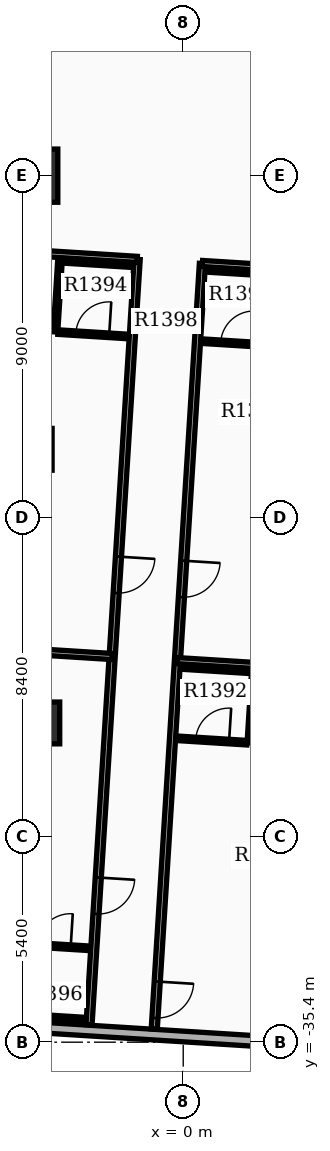
"""IFC4 building model, lengths in metres.
Left out: names, types, materials, properties, quantities, classifications, styles, units other than length and angle.
Written with IfcOpenShell. Run it as: python <this file> out.ifc"""

import sys

from ifc_helpers import new_model, si_unit, direction, frame, frame_2d, origin, origin_2d, place, context, subcontext, project, spatial, rectangle, extrude, element, fill, save


model = new_model("IFC4")
c1 = context("Model", 3, precision=1e-05, world=origin(), true_north=direction((0.0, 1.0)))
c2 = subcontext(c1, "Body", "Model", "MODEL_VIEW")
j1 = project(units=[si_unit("LENGTHUNIT", "METRE"), si_unit("PLANEANGLEUNIT", "RADIAN")], contexts=[c1])
p1 = place(None, origin())
s1 = spatial("IfcSite", under=j1, at=p1, CompositionType="ELEMENT")
p2 = place(p1, origin())
s2 = spatial("IfcBuilding", under=s1, at=p2, CompositionType="ELEMENT")
p3 = place(p2, frame((0.0, 0.0, 87.3)))
s3 = spatial("IfcBuildingStorey", under=s2, at=p3, CompositionType="ELEMENT", Elevation=87.3)
p4 = place(p3, frame((-4.0, -12.6, 0.0), z_axis=(0.0, 0.0, 1.0), x_axis=(1.0, 0.0, 0.0)))
e1 = element("IfcColumn", 1, at=p4, inside=s3, PredefinedType="COLUMN", context=c2, shape_type="SweptSolid", body=[
    extrude(rectangle(XDim=1.4, YDim=1.4, at=origin_2d()), origin(), (0.0, 0.0, 1.0), 3.9),
])
p5 = place(p3, frame((-3.8, -27.0, 0.0), z_axis=(0.0, 0.0, 1.0), x_axis=(1.0, 0.0, 0.0)))
e2 = element("IfcColumn", 2, at=p5, inside=s3, PredefinedType="COLUMN", context=c2, shape_type="SweptSolid", body=[
    extrude(rectangle(XDim=1.1, YDim=1.1, at=origin_2d()), origin(), (0.0, 0.0, 1.0), 3.9),
])
p6 = place(p3, frame((-9.055, -34.68, 0.0), z_axis=(0.0, 0.0, 1.0), x_axis=(0.998026318072, -0.062797041623, 0.0)))
e3 = element("IfcWall", 3, at=p6, inside=s3, PredefinedType="STANDARD", context=c2, shape_type="SweptSolid", body=[
    extrude(rectangle(XDim=13.72, YDim=0.28, at=frame_2d((6.86, 0.0))), origin(), (0.0, 0.0, 1.0), 2.91),
])
p7 = place(p6, frame((0.85, 0.0, 0.85)))
e4 = element("IfcOpeningElement", 4, at=p7, cuts=e3, PredefinedType="OPENING", context=c2, shape_type="SweptSolid", body=[
    extrude(rectangle(XDim=1.0, YDim=1.5, at=frame_2d((0.5, 0.75))), frame((0.0, 0.15, 0.0), z_axis=(0.0, -1.0, 0.0), x_axis=(1.0, 0.0, 0.0)), (0.0, 0.0, 1.0), 0.3),
])
p8 = place(p3, frame((0.505, -14.911, 0.0), z_axis=(0.0, 0.0, 1.0), x_axis=(-0.062783460104, -0.998027172545, 0.0)))
e5 = element("IfcWall", 5, at=p8, inside=s3, PredefinedType="PARTITIONING", context=c2, shape_type="SweptSolid", body=[
    extrude(rectangle(XDim=20.182, YDim=0.16, at=frame_2d((10.091, 0.0))), origin(), (0.0, 0.0, 1.0), 2.9),
])
p9 = place(p8, frame((7.836, 0.0, 0.0)))
e6 = element("IfcOpeningElement", 6, at=p9, cuts=e5, PredefinedType="OPENING", context=c2, shape_type="SweptSolid", body=[
    extrude(rectangle(XDim=0.96, YDim=2.15, at=frame_2d((0.48, 1.075))), frame((0.0, 0.09, 0.0), z_axis=(0.0, -1.0, 0.0), x_axis=(1.0, 0.0, 0.0)), (0.0, 0.0, 1.0), 0.18),
])
p10 = place(p8, frame((18.93, 0.0, 0.0)))
e7 = element("IfcOpeningElement", 7, at=p10, cuts=e5, PredefinedType="OPENING", context=c2, shape_type="SweptSolid", body=[
    extrude(rectangle(XDim=0.96, YDim=2.15, at=frame_2d((0.48, 1.075))), frame((0.0, 0.09, 0.0), z_axis=(0.0, -1.0, 0.0), x_axis=(1.0, 0.0, 0.0)), (0.0, 0.0, 1.0), 0.18),
])
p11 = place(p3, frame((0.505, -14.911, 0.0), z_axis=(0.0, 0.0, 1.0), x_axis=(0.998026766364, -0.06278991655, 0.0)))
e8 = element("IfcWall", 8, at=p11, inside=s3, PredefinedType="PARTITIONING", context=c2, shape_type="SweptSolid", body=[
    extrude(rectangle(XDim=5.28, YDim=0.16, at=frame_2d((2.64, 0.0))), origin(), (0.0, 0.0, 1.0), 2.9),
])
p12 = place(p3, frame((-0.153, -25.361, 0.0), z_axis=(0.0, 0.0, 1.0), x_axis=(0.998029371307, -0.062748498058, 0.0)))
e9 = element("IfcWall", 9, at=p12, inside=s3, PredefinedType="PARTITIONING", context=c2, shape_type="SweptSolid", body=[
    extrude(rectangle(XDim=5.132, YDim=0.16, at=frame_2d((2.566, 0.0))), origin(), (0.0, 0.0, 1.0), 2.9),
])
p13 = place(p3, frame((0.516, -16.956, 0.0), z_axis=(0.0, 0.0, 1.0), x_axis=(0.998019030272, -0.062912758763, 0.0)))
e10 = element("IfcWall", 10, at=p13, inside=s3, PredefinedType="PARTITIONING", context=c2, shape_type="SweptSolid", body=[
    extrude(rectangle(XDim=1.82, YDim=0.12, at=frame_2d((0.91, 0.0))), origin(), (0.0, 0.0, 1.0), 2.9),
])
p14 = place(p13, frame((0.47, 0.0, 0.0)))
e11 = element("IfcOpeningElement", 11, at=p14, cuts=e10, PredefinedType="OPENING", context=c2, shape_type="SweptSolid", body=[
    extrude(rectangle(XDim=0.88, YDim=2.1, at=frame_2d((0.44, 1.05))), frame((0.0, 0.07, 0.0), z_axis=(0.0, -1.0, 0.0), x_axis=(1.0, 0.0, 0.0)), (0.0, 0.0, 1.0), 0.14),
])
p15 = place(p3, frame((0.635, -15.08, 0.0), z_axis=(0.0, 0.0, 1.0), x_axis=(0.998026915151, -0.062787551592, 0.0)))
e12 = element("IfcWall", 12, at=p15, inside=s3, PredefinedType="PARTITIONING", context=c2, shape_type="SweptSolid", body=[
    extrude(rectangle(XDim=1.82, YDim=0.12, at=frame_2d((0.91, 0.0))), origin(), (0.0, 0.0, 1.0), 2.9),
])
p16 = place(p3, frame((-0.141, -27.405, 0.0), z_axis=(0.0, 0.0, 1.0), x_axis=(0.998027443946, -0.062779145668, 0.0)))
e13 = element("IfcWall", 13, at=p16, inside=s3, PredefinedType="PARTITIONING", context=c2, shape_type="SweptSolid", body=[
    extrude(rectangle(XDim=1.82, YDim=0.12, at=frame_2d((0.91, 0.0))), origin(), (0.0, 0.0, 1.0), 2.9),
])
p17 = place(p16, frame((0.47, 0.0, 0.0)))
e14 = element("IfcOpeningElement", 14, at=p17, cuts=e13, PredefinedType="OPENING", context=c2, shape_type="SweptSolid", body=[
    extrude(rectangle(XDim=0.88, YDim=2.1, at=frame_2d((0.44, 1.05))), frame((0.0, 0.07, 0.0), z_axis=(0.0, -1.0, 0.0), x_axis=(1.0, 0.0, 0.0)), (0.0, 0.0, 1.0), 0.14),
])
p18 = place(p3, frame((-0.023, -25.529, 0.0), z_axis=(0.0, 0.0, 1.0), x_axis=(0.998019030272, -0.062912758763, 0.0)))
e15 = element("IfcWall", 15, at=p18, inside=s3, PredefinedType="PARTITIONING", context=c2, shape_type="SweptSolid", body=[
    extrude(rectangle(XDim=1.82, YDim=0.12, at=frame_2d((0.91, 0.0))), origin(), (0.0, 0.0, 1.0), 2.9),
])
p19 = place(p3, frame((1.858, -25.647, 0.0), z_axis=(0.0, 0.0, 1.0), x_axis=(-0.062847152131, -0.998023163794, 0.0)))
e16 = element("IfcWall", 16, at=p19, inside=s3, PredefinedType="PARTITIONING", context=c2, shape_type="SweptSolid", body=[
    extrude(rectangle(XDim=1.88, YDim=0.12, at=frame_2d((0.94, 0.0))), origin(), (0.0, 0.0, 1.0), 2.9),
])
p20 = place(p3, frame((-1.212, -14.803, 0.0), z_axis=(0.0, 0.0, 1.0), x_axis=(-0.06278270212, -0.998027220227, 0.0)))
e17 = element("IfcWall", 17, at=p20, inside=s3, PredefinedType="PARTITIONING", context=c2, shape_type="SweptSolid", body=[
    extrude(rectangle(XDim=20.182, YDim=0.16, at=frame_2d((10.091, 0.0))), origin(), (0.0, 0.0, 1.0), 2.9),
])
p21 = place(p20, frame((7.836, 0.0, 0.0)))
e18 = element("IfcOpeningElement", 18, at=p21, cuts=e17, PredefinedType="OPENING", context=c2, shape_type="SweptSolid", body=[
    extrude(rectangle(XDim=0.96, YDim=2.15, at=frame_2d((0.48, 1.075))), frame((0.0, 0.09, 0.0), z_axis=(0.0, -1.0, 0.0), x_axis=(1.0, 0.0, 0.0)), (0.0, 0.0, 1.0), 0.18),
])
p22 = place(p20, frame((16.296, 0.0, 0.0)))
e19 = element("IfcOpeningElement", 19, at=p22, cuts=e17, PredefinedType="OPENING", context=c2, shape_type="SweptSolid", body=[
    extrude(rectangle(XDim=0.96, YDim=2.15, at=frame_2d((0.48, 1.075))), frame((0.0, 0.09, 0.0), z_axis=(0.0, -1.0, 0.0), x_axis=(1.0, 0.0, 0.0)), (0.0, 0.0, 1.0), 0.18),
])
p23 = place(p3, frame((-1.212, -14.803, 0.0), z_axis=(0.0, 0.0, 1.0), x_axis=(-0.998027420959, 0.062779511096, 0.0)))
e20 = element("IfcWall", 20, at=p23, inside=s3, PredefinedType="PARTITIONING", context=c2, shape_type="SweptSolid", body=[
    extrude(rectangle(XDim=6.44, YDim=0.16, at=frame_2d((3.22, 0.0))), origin(), (0.0, 0.0, 1.0), 2.9),
])
p24 = place(p3, frame((-1.869, -25.252, 0.0), z_axis=(0.0, 0.0, 1.0), x_axis=(-0.998027283173, 0.062781701496, 0.0)))
e21 = element("IfcWall", 21, at=p24, inside=s3, PredefinedType="PARTITIONING", context=c2, shape_type="SweptSolid", body=[
    extrude(rectangle(XDim=6.292, YDim=0.16, at=frame_2d((3.146, 0.0))), origin(), (0.0, 0.0, 1.0), 2.9),
])
p25 = place(p3, frame((-3.296, -16.716, 0.0), z_axis=(0.0, 0.0, 1.0), x_axis=(0.998027443946, -0.062779145668, 0.0)))
e22 = element("IfcWall", 22, at=p25, inside=s3, PredefinedType="PARTITIONING", context=c2, shape_type="SweptSolid", body=[
    extrude(rectangle(XDim=1.82, YDim=0.12, at=frame_2d((0.91, 0.0))), origin(), (0.0, 0.0, 1.0), 2.9),
])
p26 = place(p25, frame((0.47, 0.0, 0.0)))
e23 = element("IfcOpeningElement", 23, at=p26, cuts=e22, PredefinedType="OPENING", context=c2, shape_type="SweptSolid", body=[
    extrude(rectangle(XDim=0.88, YDim=2.1, at=frame_2d((0.44, 1.05))), frame((0.0, 0.07, 0.0), z_axis=(0.0, -1.0, 0.0), x_axis=(1.0, 0.0, 0.0)), (0.0, 0.0, 1.0), 0.14),
])
p27 = place(p3, frame((-3.178, -14.84, 0.0), z_axis=(0.0, 0.0, 1.0), x_axis=(0.998018499228, -0.062921182436, 0.0)))
e24 = element("IfcWall", 24, at=p27, inside=s3, PredefinedType="PARTITIONING", context=c2, shape_type="SweptSolid", body=[
    extrude(rectangle(XDim=1.82, YDim=0.12, at=frame_2d((0.91, 0.0))), origin(), (0.0, 0.0, 1.0), 2.9),
])
p28 = place(p3, frame((-3.243, -14.836, 0.0), z_axis=(0.0, 0.0, 1.0), x_axis=(-0.062855297722, -0.998022650819, 0.0)))
e25 = element("IfcWall", 25, at=p28, inside=s3, PredefinedType="PARTITIONING", context=c2, shape_type="SweptSolid", body=[
    extrude(rectangle(XDim=1.88, YDim=0.12, at=frame_2d((0.94, 0.0))), origin(), (0.0, 0.0, 1.0), 2.9),
])
p29 = place(p3, frame((-4.309, -32.814, 0.0), z_axis=(0.0, 0.0, 1.0), x_axis=(0.998027443946, -0.062779145668, 0.0)))
e26 = element("IfcWall", 26, at=p29, inside=s3, PredefinedType="PARTITIONING", context=c2, shape_type="SweptSolid", body=[
    extrude(rectangle(XDim=1.82, YDim=0.12, at=frame_2d((0.91, 0.0))), origin(), (0.0, 0.0, 1.0), 2.9),
])
p30 = place(p29, frame((0.47, 0.0, 0.0)))
e27 = element("IfcOpeningElement", 27, at=p30, cuts=e26, PredefinedType="OPENING", context=c2, shape_type="SweptSolid", body=[
    extrude(rectangle(XDim=0.88, YDim=2.1, at=frame_2d((0.44, 1.05))), frame((0.0, 0.07, 0.0), z_axis=(0.0, -1.0, 0.0), x_axis=(1.0, 0.0, 0.0)), (0.0, 0.0, 1.0), 0.14),
])
p31 = place(p3, frame((-4.427, -34.69, 0.0), z_axis=(0.0, 0.0, 1.0), x_axis=(0.998027443946, -0.062779145668, 0.0)))
e28 = element("IfcWall", 28, at=p31, inside=s3, PredefinedType="PARTITIONING", context=c2, shape_type="SweptSolid", body=[
    extrude(rectangle(XDim=1.82, YDim=0.12, at=frame_2d((0.91, 0.0))), origin(), (0.0, 0.0, 1.0), 2.9),
])
p32 = place(p9, origin())
e29 = element("IfcDoor", 29, at=p32, inside=s3, OperationType="SINGLE_SWING_LEFT", PredefinedType="DOOR", context=c2, shape_type="SweptSolid", body=[
    extrude(rectangle(XDim=0.96, YDim=2.15, at=frame_2d((0.48, 1.075))), frame((0.0, 0.025, 0.0), z_axis=(0.0, -1.0, 0.0), x_axis=(1.0, 0.0, 0.0)), (0.0, 0.0, 1.0), 0.05),
])
fill(e6, e29)
p33 = place(p14, origin())
e30 = element("IfcDoor", 30, at=p33, inside=s3, OperationType="SINGLE_SWING_RIGHT", PredefinedType="DOOR", context=c2, shape_type="SweptSolid", body=[
    extrude(rectangle(XDim=0.88, YDim=2.1, at=frame_2d((0.44, 1.05))), frame((0.0, 0.025, 0.0), z_axis=(0.0, -1.0, 0.0), x_axis=(1.0, 0.0, 0.0)), (0.0, 0.0, 1.0), 0.05),
])
fill(e11, e30)
p34 = place(p10, origin())
e31 = element("IfcDoor", 31, at=p34, inside=s3, OperationType="SINGLE_SWING_LEFT", PredefinedType="DOOR", context=c2, shape_type="SweptSolid", body=[
    extrude(rectangle(XDim=0.96, YDim=2.15, at=frame_2d((0.48, 1.075))), frame((0.0, 0.025, 0.0), z_axis=(0.0, -1.0, 0.0), x_axis=(1.0, 0.0, 0.0)), (0.0, 0.0, 1.0), 0.05),
])
fill(e7, e31)
p35 = place(p17, origin())
e32 = element("IfcDoor", 32, at=p35, inside=s3, OperationType="SINGLE_SWING_RIGHT", PredefinedType="DOOR", context=c2, shape_type="SweptSolid", body=[
    extrude(rectangle(XDim=0.88, YDim=2.1, at=frame_2d((0.44, 1.05))), frame((0.0, 0.025, 0.0), z_axis=(0.0, -1.0, 0.0), x_axis=(1.0, 0.0, 0.0)), (0.0, 0.0, 1.0), 0.05),
])
fill(e14, e32)
p36 = place(p21, origin())
e33 = element("IfcDoor", 33, at=p36, inside=s3, OperationType="SINGLE_SWING_LEFT", PredefinedType="DOOR", context=c2, shape_type="SweptSolid", body=[
    extrude(rectangle(XDim=0.96, YDim=2.15, at=frame_2d((0.48, 1.075))), frame((0.0, 0.025, 0.0), z_axis=(0.0, -1.0, 0.0), x_axis=(1.0, 0.0, 0.0)), (0.0, 0.0, 1.0), 0.05),
])
fill(e18, e33)
p37 = place(p26, origin())
e34 = element("IfcDoor", 34, at=p37, inside=s3, OperationType="SINGLE_SWING_RIGHT", PredefinedType="DOOR", context=c2, shape_type="SweptSolid", body=[
    extrude(rectangle(XDim=0.88, YDim=2.1, at=frame_2d((0.44, 1.05))), frame((0.0, 0.025, 0.0), z_axis=(0.0, -1.0, 0.0), x_axis=(1.0, 0.0, 0.0)), (0.0, 0.0, 1.0), 0.05),
])
fill(e23, e34)
p38 = place(p22, origin())
e35 = element("IfcDoor", 35, at=p38, inside=s3, OperationType="SINGLE_SWING_LEFT", PredefinedType="DOOR", context=c2, shape_type="SweptSolid", body=[
    extrude(rectangle(XDim=0.96, YDim=2.15, at=frame_2d((0.48, 1.075))), frame((0.0, 0.025, 0.0), z_axis=(0.0, -1.0, 0.0), x_axis=(1.0, 0.0, 0.0)), (0.0, 0.0, 1.0), 0.05),
])
fill(e19, e35)
p39 = place(p30, origin())
e36 = element("IfcDoor", 36, at=p39, inside=s3, OperationType="SINGLE_SWING_RIGHT", PredefinedType="DOOR", context=c2, shape_type="SweptSolid", body=[
    extrude(rectangle(XDim=0.88, YDim=2.1, at=frame_2d((0.44, 1.05))), frame((0.0, 0.025, 0.0), z_axis=(0.0, -1.0, 0.0), x_axis=(1.0, 0.0, 0.0)), (0.0, 0.0, 1.0), 0.05),
])
fill(e27, e36)
save(model, sys.argv[1])
